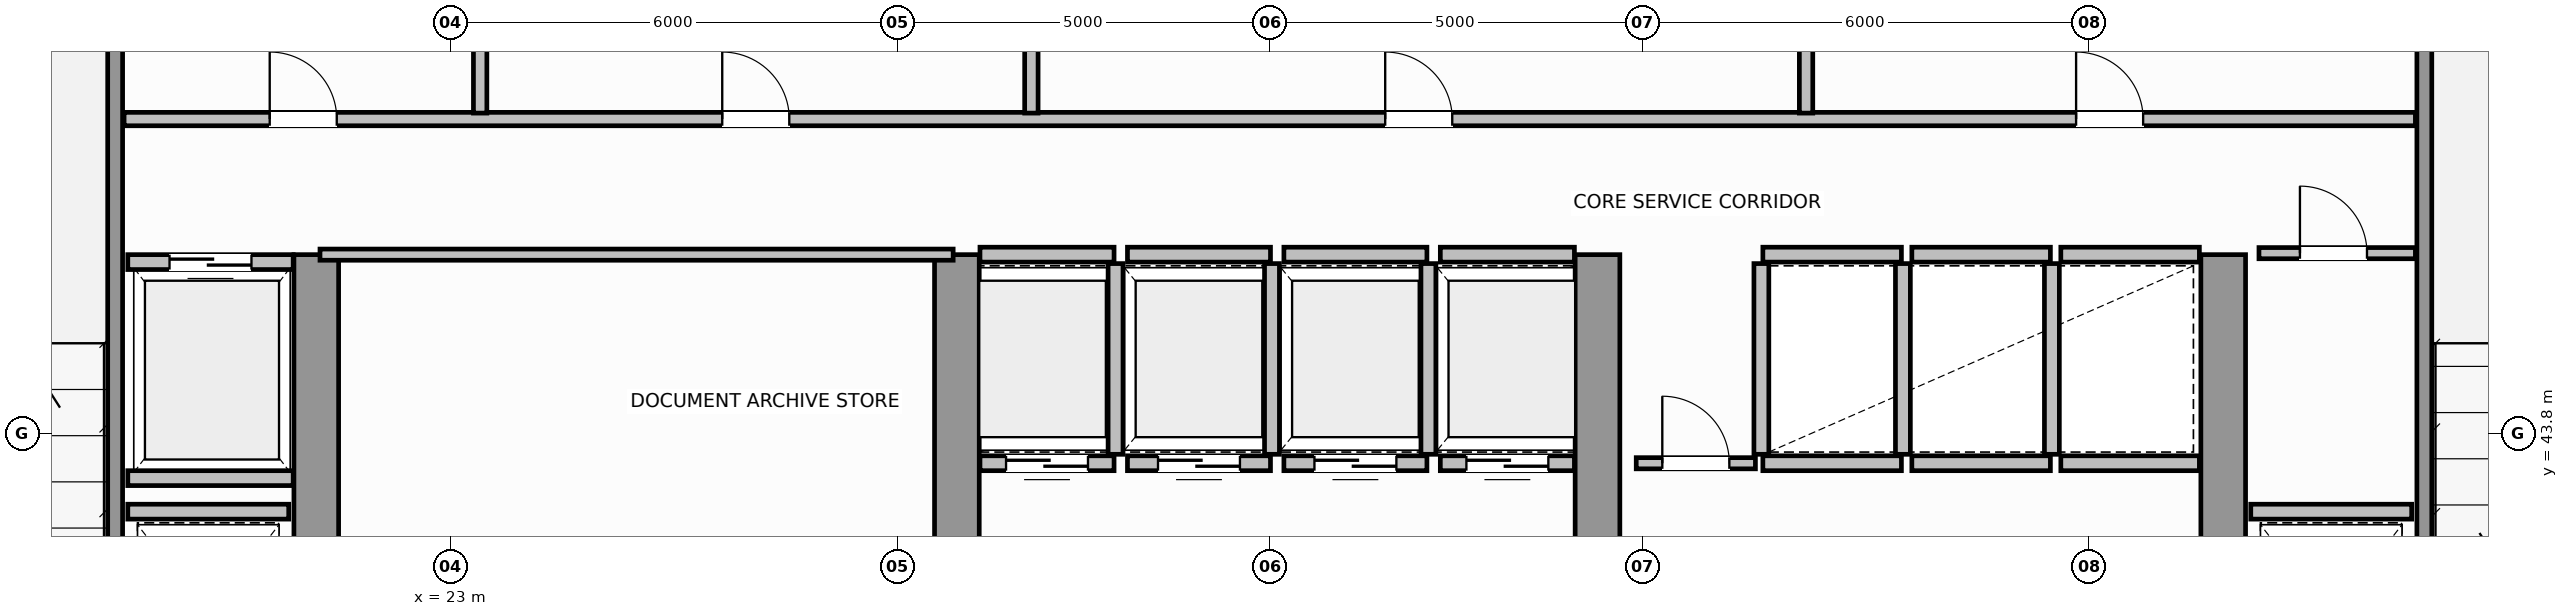
"""IFC4 building model, lengths in metres.
Left out: names, types, materials, properties, quantities, classifications, styles, units other than length and angle.
Written with IfcOpenShell. Run it as: python <this file> out.ifc"""

import sys

from ifc_helpers import new_model, si_unit, direction, frame, frame_2d, origin, place, context, subcontext, project, spatial, rectangle, extrude, source, transform, mapped, element, fill, save


model = new_model("IFC4")
c1 = context("Model", 3, precision=1e-05, world=origin(), true_north=direction((0.0, 1.0)))
c2 = subcontext(c1, "Body", "Model", "MODEL_VIEW")
j1 = project(units=[si_unit("LENGTHUNIT", "METRE"), si_unit("PLANEANGLEUNIT", "RADIAN")], contexts=[c1])
p1 = place(None, origin())
s1 = spatial("IfcSite", under=j1, at=p1, CompositionType="ELEMENT")
p2 = place(p1, origin())
s2 = spatial("IfcBuilding", under=s1, at=p2, CompositionType="ELEMENT")
p3 = place(p2, frame((0.0, 0.0, 176.6)))
s3 = spatial("IfcBuildingStorey", under=s2, at=p3, CompositionType="ELEMENT", Elevation=176.6)
for number, where, z_axis, x_axis in (
    (1, (21.2, 36.82, 0.0), (0.0, 0.0, 1.0), (0.0, 1.0, 0.0)),
    (2, (29.8, 36.82, 0.0), (0.0, 0.0, 1.0), (0.0, 1.0, 0.0)),
    (3, (38.4, 36.82, 0.0), (0.0, 0.0, 1.0), (0.0, 1.0, 0.0)),
    (4, (46.8, 36.82, 0.0), (0.0, 0.0, 1.0), (0.0, 1.0, 0.0)),
):
    element("IfcWall", number, at=place(p3, frame(where, z_axis=z_axis, x_axis=x_axis)), inside=s3, PredefinedType="SHEAR", context=c2, shape_type="SweptSolid", body=[
        extrude(rectangle(XDim=9.38, YDim=0.6, at=frame_2d((4.69, 0.0))), origin(), (0.0, 0.0, 1.0), 3.8),
    ])
for number, where, z_axis, x_axis in (
    (5, (18.5, 39.96, 0.0), (0.0, 0.0, 1.0), (0.0, 1.0, 0.0)),
    (6, (49.5, 39.96, 0.0), (0.0, 0.0, 1.0), (0.0, 1.0, 0.0)),
):
    element("IfcWall", number, at=place(p3, frame(where, z_axis=z_axis, x_axis=x_axis)), inside=s3, PredefinedType="SOLIDWALL", context=c2, shape_type="SweptSolid", body=[
        extrude(rectangle(XDim=9.93, YDim=0.2, at=frame_2d((4.965, 0.0))), origin(), (0.0, 0.0, 1.0), 3.8),
    ])
p4 = place(p3, frame((30.11, 43.4, 0.0), z_axis=(0.0, 0.0, 1.0), x_axis=(1.0, 0.0, 0.0)))
e7 = element("IfcWall", 7, at=p4, inside=s3, PredefinedType="SOLIDWALL", context=c2, shape_type="SweptSolid", body=[
    extrude(rectangle(XDim=1.8, YDim=0.2, at=frame_2d((0.9, 0.0))), origin(), (0.0, 0.0, 1.0), 3.58),
])
p5 = place(p4, frame((0.35, 0.0, 0.0)))
e8 = element("IfcOpeningElement", 8, at=p5, cuts=e7, PredefinedType="OPENING", context=c2, shape_type="SweptSolid", body=[
    extrude(rectangle(XDim=1.1, YDim=2.15, at=frame_2d((0.55, 1.075))), frame((0.0, 0.11, 0.0), z_axis=(0.0, -1.0, 0.0), x_axis=(1.0, 0.0, 0.0)), (0.0, 0.0, 1.0), 0.22),
])
p6 = place(p3, frame((30.11, 46.2, 0.0), z_axis=(0.0, 0.0, 1.0), x_axis=(1.0, 0.0, 0.0)))
e9 = element("IfcWall", 9, at=p6, inside=s3, PredefinedType="SOLIDWALL", context=c2, shape_type="SweptSolid", body=[
    extrude(rectangle(XDim=1.8, YDim=0.2, at=frame_2d((0.9, 0.0))), origin(), (0.0, 0.0, 1.0), 3.58),
])
p7 = place(p3, frame((31.93, 43.52, 0.0), z_axis=(0.0, 0.0, 1.0), x_axis=(0.0, 1.0, 0.0)))
e10 = element("IfcWall", 10, at=p7, inside=s3, PredefinedType="SOLIDWALL", context=c2, shape_type="SweptSolid", body=[
    extrude(rectangle(XDim=2.56, YDim=0.2, at=frame_2d((1.28, 0.0))), origin(), (0.0, 0.0, 1.0), 3.58),
])
p8 = place(p3, frame((32.09, 43.4, 0.0), z_axis=(0.0, 0.0, 1.0), x_axis=(1.0, 0.0, 0.0)))
e11 = element("IfcWall", 11, at=p8, inside=s3, PredefinedType="SOLIDWALL", context=c2, shape_type="SweptSolid", body=[
    extrude(rectangle(XDim=1.92, YDim=0.2, at=frame_2d((0.96, 0.0))), origin(), (0.0, 0.0, 1.0), 3.58),
])
p9 = place(p8, frame((0.41, 0.0, 0.0)))
e12 = element("IfcOpeningElement", 12, at=p9, cuts=e11, PredefinedType="OPENING", context=c2, shape_type="SweptSolid", body=[
    extrude(rectangle(XDim=1.1, YDim=2.15, at=frame_2d((0.55, 1.075))), frame((0.0, 0.11, 0.0), z_axis=(0.0, -1.0, 0.0), x_axis=(1.0, 0.0, 0.0)), (0.0, 0.0, 1.0), 0.22),
])
p10 = place(p3, frame((32.09, 46.2, 0.0), z_axis=(0.0, 0.0, 1.0), x_axis=(1.0, 0.0, 0.0)))
e13 = element("IfcWall", 13, at=p10, inside=s3, PredefinedType="SOLIDWALL", context=c2, shape_type="SweptSolid", body=[
    extrude(rectangle(XDim=1.92, YDim=0.2, at=frame_2d((0.96, 0.0))), origin(), (0.0, 0.0, 1.0), 3.58),
])
p11 = place(p3, frame((34.03, 43.52, 0.0), z_axis=(0.0, 0.0, 1.0), x_axis=(0.0, 1.0, 0.0)))
e14 = element("IfcWall", 14, at=p11, inside=s3, PredefinedType="SOLIDWALL", context=c2, shape_type="SweptSolid", body=[
    extrude(rectangle(XDim=2.56, YDim=0.2, at=frame_2d((1.28, 0.0))), origin(), (0.0, 0.0, 1.0), 3.58),
])
p12 = place(p3, frame((34.19, 43.4, 0.0), z_axis=(0.0, 0.0, 1.0), x_axis=(1.0, 0.0, 0.0)))
e15 = element("IfcWall", 15, at=p12, inside=s3, PredefinedType="SOLIDWALL", context=c2, shape_type="SweptSolid", body=[
    extrude(rectangle(XDim=1.92, YDim=0.2, at=frame_2d((0.96, 0.0))), origin(), (0.0, 0.0, 1.0), 3.58),
])
p13 = place(p12, frame((0.41, 0.0, 0.0)))
e16 = element("IfcOpeningElement", 16, at=p13, cuts=e15, PredefinedType="OPENING", context=c2, shape_type="SweptSolid", body=[
    extrude(rectangle(XDim=1.1, YDim=2.15, at=frame_2d((0.55, 1.075))), frame((0.0, 0.11, 0.0), z_axis=(0.0, -1.0, 0.0), x_axis=(1.0, 0.0, 0.0)), (0.0, 0.0, 1.0), 0.22),
])
p14 = place(p3, frame((34.19, 46.2, 0.0), z_axis=(0.0, 0.0, 1.0), x_axis=(1.0, 0.0, 0.0)))
e17 = element("IfcWall", 17, at=p14, inside=s3, PredefinedType="SOLIDWALL", context=c2, shape_type="SweptSolid", body=[
    extrude(rectangle(XDim=1.92, YDim=0.2, at=frame_2d((0.96, 0.0))), origin(), (0.0, 0.0, 1.0), 3.58),
])
p15 = place(p3, frame((36.13, 43.52, 0.0), z_axis=(0.0, 0.0, 1.0), x_axis=(0.0, 1.0, 0.0)))
e18 = element("IfcWall", 18, at=p15, inside=s3, PredefinedType="SOLIDWALL", context=c2, shape_type="SweptSolid", body=[
    extrude(rectangle(XDim=2.56, YDim=0.2, at=frame_2d((1.28, 0.0))), origin(), (0.0, 0.0, 1.0), 3.58),
])
p16 = place(p3, frame((36.29, 43.4, 0.0), z_axis=(0.0, 0.0, 1.0), x_axis=(1.0, 0.0, 0.0)))
e19 = element("IfcWall", 19, at=p16, inside=s3, PredefinedType="SOLIDWALL", context=c2, shape_type="SweptSolid", body=[
    extrude(rectangle(XDim=1.8, YDim=0.2, at=frame_2d((0.9, 0.0))), origin(), (0.0, 0.0, 1.0), 3.58),
])
p17 = place(p16, frame((0.35, 0.0, 0.0)))
e20 = element("IfcOpeningElement", 20, at=p17, cuts=e19, PredefinedType="OPENING", context=c2, shape_type="SweptSolid", body=[
    extrude(rectangle(XDim=1.1, YDim=2.15, at=frame_2d((0.55, 1.075))), frame((0.0, 0.11, 0.0), z_axis=(0.0, -1.0, 0.0), x_axis=(1.0, 0.0, 0.0)), (0.0, 0.0, 1.0), 0.22),
])
p18 = place(p3, frame((36.29, 46.2, 0.0), z_axis=(0.0, 0.0, 1.0), x_axis=(1.0, 0.0, 0.0)))
e21 = element("IfcWall", 21, at=p18, inside=s3, PredefinedType="SOLIDWALL", context=c2, shape_type="SweptSolid", body=[
    extrude(rectangle(XDim=1.8, YDim=0.2, at=frame_2d((0.9, 0.0))), origin(), (0.0, 0.0, 1.0), 3.58),
])
for number, where, z_axis, x_axis in (
    (22, (40.62, 43.4, 0.0), (0.0, 0.0, 1.0), (1.0, 0.0, 0.0)),
    (23, (40.62, 46.2, 0.0), (0.0, 0.0, 1.0), (1.0, 0.0, 0.0)),
):
    element("IfcWall", number, at=place(p3, frame(where, z_axis=z_axis, x_axis=x_axis)), inside=s3, PredefinedType="SOLIDWALL", context=c2, shape_type="SweptSolid", body=[
        extrude(rectangle(XDim=1.86, YDim=0.2, at=frame_2d((0.93, 0.0))), origin(), (0.0, 0.0, 1.0), 3.58),
    ])
for number, where, z_axis, x_axis in (
    (24, (40.6, 43.52, 0.0), (0.0, 0.0, 1.0), (0.0, 1.0, 0.0)),
    (25, (42.5, 43.52, 0.0), (0.0, 0.0, 1.0), (0.0, 1.0, 0.0)),
):
    element("IfcWall", number, at=place(p3, frame(where, z_axis=z_axis, x_axis=x_axis)), inside=s3, PredefinedType="SOLIDWALL", context=c2, shape_type="SweptSolid", body=[
        extrude(rectangle(XDim=2.56, YDim=0.2, at=frame_2d((1.28, 0.0))), origin(), (0.0, 0.0, 1.0), 3.58),
    ])
for number, where, z_axis, x_axis in (
    (26, (42.62, 43.4, 0.0), (0.0, 0.0, 1.0), (1.0, 0.0, 0.0)),
    (27, (42.62, 46.2, 0.0), (0.0, 0.0, 1.0), (1.0, 0.0, 0.0)),
):
    element("IfcWall", number, at=place(p3, frame(where, z_axis=z_axis, x_axis=x_axis)), inside=s3, PredefinedType="SOLIDWALL", context=c2, shape_type="SweptSolid", body=[
        extrude(rectangle(XDim=1.86, YDim=0.2, at=frame_2d((0.93, 0.0))), origin(), (0.0, 0.0, 1.0), 3.58),
    ])
p19 = place(p3, frame((44.5, 43.52, 0.0), z_axis=(0.0, 0.0, 1.0), x_axis=(0.0, 1.0, 0.0)))
e28 = element("IfcWall", 28, at=p19, inside=s3, PredefinedType="SOLIDWALL", context=c2, shape_type="SweptSolid", body=[
    extrude(rectangle(XDim=2.56, YDim=0.2, at=frame_2d((1.28, 0.0))), origin(), (0.0, 0.0, 1.0), 2.37),
])
for number, where, z_axis, x_axis in (
    (29, (44.62, 43.4, 0.0), (0.0, 0.0, 1.0), (1.0, 0.0, 0.0)),
    (30, (44.62, 46.2, 0.0), (0.0, 0.0, 1.0), (1.0, 0.0, 0.0)),
):
    element("IfcWall", number, at=place(p3, frame(where, z_axis=z_axis, x_axis=x_axis)), inside=s3, PredefinedType="SOLIDWALL", context=c2, shape_type="SweptSolid", body=[
        extrude(rectangle(XDim=1.86, YDim=0.2, at=frame_2d((0.93, 0.0))), origin(), (0.0, 0.0, 1.0), 3.58),
    ])
p20 = place(p3, frame((18.67, 46.1, 0.0), z_axis=(0.0, 0.0, 1.0), x_axis=(1.0, 0.0, 0.0)))
e31 = element("IfcWall", 31, at=p20, inside=s3, PredefinedType="SOLIDWALL", context=c2, shape_type="SweptSolid", body=[
    extrude(rectangle(XDim=2.22, YDim=0.2, at=frame_2d((1.11, 0.0))), origin(), (0.0, 0.0, 1.0), 3.58),
])
p21 = place(p20, frame((0.56, 0.0, 0.0)))
e32 = element("IfcOpeningElement", 32, at=p21, cuts=e31, PredefinedType="OPENING", context=c2, shape_type="SweptSolid", body=[
    extrude(rectangle(XDim=1.1, YDim=2.15, at=frame_2d((0.55, 1.075))), frame((0.0, 0.11, 0.0), z_axis=(0.0, -1.0, 0.0), x_axis=(1.0, 0.0, 0.0)), (0.0, 0.0, 1.0), 0.22),
])
p22 = place(p3, frame((18.67, 43.2, 0.0), z_axis=(0.0, 0.0, 1.0), x_axis=(1.0, 0.0, 0.0)))
e33 = element("IfcWall", 33, at=p22, inside=s3, PredefinedType="SOLIDWALL", context=c2, shape_type="SweptSolid", body=[
    extrude(rectangle(XDim=2.22, YDim=0.2, at=frame_2d((1.11, 0.0))), origin(), (0.0, 0.0, 1.0), 3.58),
])
for number, where, z_axis, x_axis in (
    (34, (18.67, 42.75, 0.0), (0.0, 0.0, 1.0), (1.0, 0.0, 0.0)),
    (35, (47.17, 42.75, 0.0), (0.0, 0.0, 1.0), (1.0, 0.0, 0.0)),
):
    element("IfcWall", number, at=place(p3, frame(where, z_axis=z_axis, x_axis=x_axis)), inside=s3, PredefinedType="SOLIDWALL", context=c2, shape_type="SweptSolid", body=[
        extrude(rectangle(XDim=2.16, YDim=0.2, at=frame_2d((1.08, 0.0))), origin(), (0.0, 0.0, 1.0), 3.58),
    ])
p23 = place(p3, frame((21.25, 46.2, 0.0), z_axis=(0.0, 0.0, 1.0), x_axis=(1.0, 0.0, 0.0)))
e36 = element("IfcWall", 36, at=p23, inside=s3, PredefinedType="PARTITIONING", context=c2, shape_type="SweptSolid", body=[
    extrude(rectangle(XDim=8.5, YDim=0.15, at=frame_2d((4.25, 0.0))), origin(), (0.0, 0.0, 1.0), 3.58),
])
p24 = place(p3, frame((47.28, 46.22, 0.0), z_axis=(0.0, 0.0, 1.0), x_axis=(1.0, 0.0, 0.0)))
e37 = element("IfcWall", 37, at=p24, inside=s3, PredefinedType="PARTITIONING", context=c2, shape_type="SweptSolid", body=[
    extrude(rectangle(XDim=2.1, YDim=0.15, at=frame_2d((1.05, 0.0))), origin(), (0.0, 0.0, 1.0), 3.58),
])
p25 = place(p24, frame((0.55, 0.0, 0.0)))
e38 = element("IfcOpeningElement", 38, at=p25, cuts=e37, PredefinedType="OPENING", context=c2, shape_type="SweptSolid", body=[
    extrude(rectangle(XDim=0.9, YDim=2.1, at=frame_2d((0.45, 1.05))), frame((0.0, 0.085, 0.0), z_axis=(0.0, -1.0, 0.0), x_axis=(1.0, 0.0, 0.0)), (0.0, 0.0, 1.0), 0.17),
])
p26 = place(p3, frame((38.92, 43.4, 0.0), z_axis=(0.0, 0.0, 1.0), x_axis=(1.0, 0.0, 0.0)))
e39 = element("IfcWall", 39, at=p26, inside=s3, PredefinedType="PARTITIONING", context=c2, shape_type="SweptSolid", body=[
    extrude(rectangle(XDim=1.6, YDim=0.15, at=frame_2d((0.8, 0.0))), origin(), (0.0, 0.0, 1.0), 3.58),
])
p27 = place(p26, frame((0.35, 0.0, 0.0)))
e40 = element("IfcOpeningElement", 40, at=p27, cuts=e39, PredefinedType="OPENING", context=c2, shape_type="SweptSolid", body=[
    extrude(rectangle(XDim=0.9, YDim=2.1, at=frame_2d((0.45, 1.05))), frame((0.0, 0.085, 0.0), z_axis=(0.0, -1.0, 0.0), x_axis=(1.0, 0.0, 0.0)), (0.0, 0.0, 1.0), 0.17),
])
p28 = place(p3, frame((18.62, 48.02, 0.0), z_axis=(0.0, 0.0, 1.0), x_axis=(1.0, 0.0, 0.0)))
e41 = element("IfcWall", 41, at=p28, inside=s3, PredefinedType="PLUMBINGWALL", context=c2, shape_type="SweptSolid", body=[
    extrude(rectangle(XDim=30.76, YDim=0.18, at=frame_2d((15.38, 0.0))), origin(), (0.0, 0.0, 1.0), 3.58),
])
p29 = place(p28, frame((1.955, 0.0, 0.0)))
e42 = element("IfcOpeningElement", 42, at=p29, cuts=e41, PredefinedType="OPENING", context=c2, shape_type="SweptSolid", body=[
    extrude(rectangle(XDim=0.9, YDim=2.15, at=frame_2d((0.45, 1.075))), frame((0.0, 0.1, 0.0), z_axis=(0.0, -1.0, 0.0), x_axis=(1.0, 0.0, 0.0)), (0.0, 0.0, 1.0), 0.2),
])
p30 = place(p28, frame((8.03, 0.0, 0.0)))
e43 = element("IfcOpeningElement", 43, at=p30, cuts=e41, PredefinedType="OPENING", context=c2, shape_type="SweptSolid", body=[
    extrude(rectangle(XDim=0.9, YDim=2.15, at=frame_2d((0.45, 1.075))), frame((0.0, 0.1, 0.0), z_axis=(0.0, -1.0, 0.0), x_axis=(1.0, 0.0, 0.0)), (0.0, 0.0, 1.0), 0.2),
])
p31 = place(p28, frame((16.93, 0.0, 0.0)))
e44 = element("IfcOpeningElement", 44, at=p31, cuts=e41, PredefinedType="OPENING", context=c2, shape_type="SweptSolid", body=[
    extrude(rectangle(XDim=0.9, YDim=2.15, at=frame_2d((0.45, 1.075))), frame((0.0, 0.1, 0.0), z_axis=(0.0, -1.0, 0.0), x_axis=(1.0, 0.0, 0.0)), (0.0, 0.0, 1.0), 0.2),
])
p32 = place(p28, frame((26.205, 0.0, 0.0)))
e45 = element("IfcOpeningElement", 45, at=p32, cuts=e41, PredefinedType="OPENING", context=c2, shape_type="SweptSolid", body=[
    extrude(rectangle(XDim=0.9, YDim=2.15, at=frame_2d((0.45, 1.075))), frame((0.0, 0.1, 0.0), z_axis=(0.0, -1.0, 0.0), x_axis=(1.0, 0.0, 0.0)), (0.0, 0.0, 1.0), 0.2),
])
p33 = place(p3, frame((23.4, 48.1, 0.0), z_axis=(0.0, 0.0, 1.0), x_axis=(0.0, 1.0, 0.0)))
e46 = element("IfcWall", 46, at=p33, inside=s3, PredefinedType="PLUMBINGWALL", context=c2, shape_type="SweptSolid", body=[
    extrude(rectangle(XDim=2.28, YDim=0.18, at=frame_2d((1.14, 0.0))), origin(), (0.0, 0.0, 1.0), 2.37),
])
for number, where, z_axis, x_axis in (
    (47, (30.8, 48.1, 0.0), (0.0, 0.0, 1.0), (0.0, 1.0, 0.0)),
    (48, (41.2, 48.1, 0.0), (0.0, 0.0, 1.0), (0.0, 1.0, 0.0)),
):
    element("IfcWall", number, at=place(p3, frame(where, z_axis=z_axis, x_axis=x_axis)), inside=s3, PredefinedType="PLUMBINGWALL", context=c2, shape_type="SweptSolid", body=[
        extrude(rectangle(XDim=2.28, YDim=0.18, at=frame_2d((1.14, 0.0))), origin(), (0.0, 0.0, 1.0), 3.58),
    ])
m1 = source(origin(), c2, "Body", "SweptSolid", [
    extrude(rectangle(XDim=1.1, YDim=2.15, at=frame_2d((0.55, 1.075))), frame((0.0, 0.025, 0.0), z_axis=(0.0, -1.0, 0.0), x_axis=(1.0, 0.0, 0.0)), (0.0, 0.0, 1.0), 0.05),
])
p34 = place(p5, origin())
e49 = element("IfcDoor", 49, at=p34, inside=s3, OperationType="DOUBLE_DOOR_SLIDING", PredefinedType="DOOR", context=c2, shape_type="MappedRepresentation", body=[
    mapped(m1, transform((0.0, 0.0, 0.0), scale=1.0)),
])
fill(e8, e49)
p35 = place(p9, origin())
e50 = element("IfcDoor", 50, at=p35, inside=s3, OperationType="DOUBLE_DOOR_SLIDING", PredefinedType="DOOR", context=c2, shape_type="MappedRepresentation", body=[
    mapped(m1, transform((0.0, 0.0, 0.0), scale=1.0)),
])
fill(e12, e50)
p36 = place(p13, origin())
e51 = element("IfcDoor", 51, at=p36, inside=s3, OperationType="DOUBLE_DOOR_SLIDING", PredefinedType="DOOR", context=c2, shape_type="MappedRepresentation", body=[
    mapped(m1, transform((0.0, 0.0, 0.0), scale=1.0)),
])
fill(e16, e51)
p37 = place(p17, origin())
e52 = element("IfcDoor", 52, at=p37, inside=s3, OperationType="DOUBLE_DOOR_SLIDING", PredefinedType="DOOR", context=c2, shape_type="MappedRepresentation", body=[
    mapped(m1, transform((0.0, 0.0, 0.0), scale=1.0)),
])
fill(e20, e52)
p38 = place(p21, origin())
e53 = element("IfcDoor", 53, at=p38, inside=s3, OperationType="DOUBLE_DOOR_SLIDING", PredefinedType="DOOR", context=c2, shape_type="MappedRepresentation", body=[
    mapped(m1, transform((0.0, 0.0, 0.0), scale=1.0)),
])
fill(e32, e53)
m2 = source(origin(), c2, "Body", "SweptSolid", [
    extrude(rectangle(XDim=0.9, YDim=2.1, at=frame_2d((0.45, 1.05))), frame((0.0, 0.025, 0.0), z_axis=(0.0, -1.0, 0.0), x_axis=(1.0, 0.0, 0.0)), (0.0, 0.0, 1.0), 0.05),
])
p39 = place(p25, origin())
e54 = element("IfcDoor", 54, at=p39, inside=s3, OperationType="SINGLE_SWING_RIGHT", PredefinedType="DOOR", context=c2, shape_type="MappedRepresentation", body=[
    mapped(m2, transform((0.0, 0.0, 0.0), scale=1.0)),
])
fill(e38, e54)
p40 = place(p27, origin())
e55 = element("IfcDoor", 55, at=p40, inside=s3, OperationType="SINGLE_SWING_LEFT", PredefinedType="DOOR", context=c2, shape_type="MappedRepresentation", body=[
    mapped(m2, transform((0.0, 0.0, 0.0), scale=1.0)),
])
fill(e40, e55)
m3 = source(origin(), c2, "Body", "SweptSolid", [
    extrude(rectangle(XDim=0.9, YDim=2.15, at=frame_2d((0.45, 1.075))), frame((0.0, 0.025, 0.0), z_axis=(0.0, -1.0, 0.0), x_axis=(1.0, 0.0, 0.0)), (0.0, 0.0, 1.0), 0.05),
])
p41 = place(p29, origin())
e56 = element("IfcDoor", 56, at=p41, inside=s3, OperationType="SINGLE_SWING_LEFT", PredefinedType="DOOR", context=c2, shape_type="MappedRepresentation", body=[
    mapped(m3, transform((0.0, 0.0, 0.0), scale=1.0)),
])
fill(e42, e56)
p42 = place(p30, origin())
e57 = element("IfcDoor", 57, at=p42, inside=s3, OperationType="SINGLE_SWING_RIGHT", PredefinedType="DOOR", context=c2, shape_type="MappedRepresentation", body=[
    mapped(m3, transform((0.0, 0.0, 0.0), scale=1.0)),
])
fill(e43, e57)
p43 = place(p31, origin())
e58 = element("IfcDoor", 58, at=p43, inside=s3, OperationType="SINGLE_SWING_LEFT", PredefinedType="DOOR", context=c2, shape_type="MappedRepresentation", body=[
    mapped(m3, transform((0.0, 0.0, 0.0), scale=1.0)),
])
fill(e44, e58)
p44 = place(p32, origin())
e59 = element("IfcDoor", 59, at=p44, inside=s3, OperationType="SINGLE_SWING_RIGHT", PredefinedType="DOOR", context=c2, shape_type="MappedRepresentation", body=[
    mapped(m3, transform((0.0, 0.0, 0.0), scale=1.0)),
])
fill(e45, e59)
save(model, sys.argv[1])
